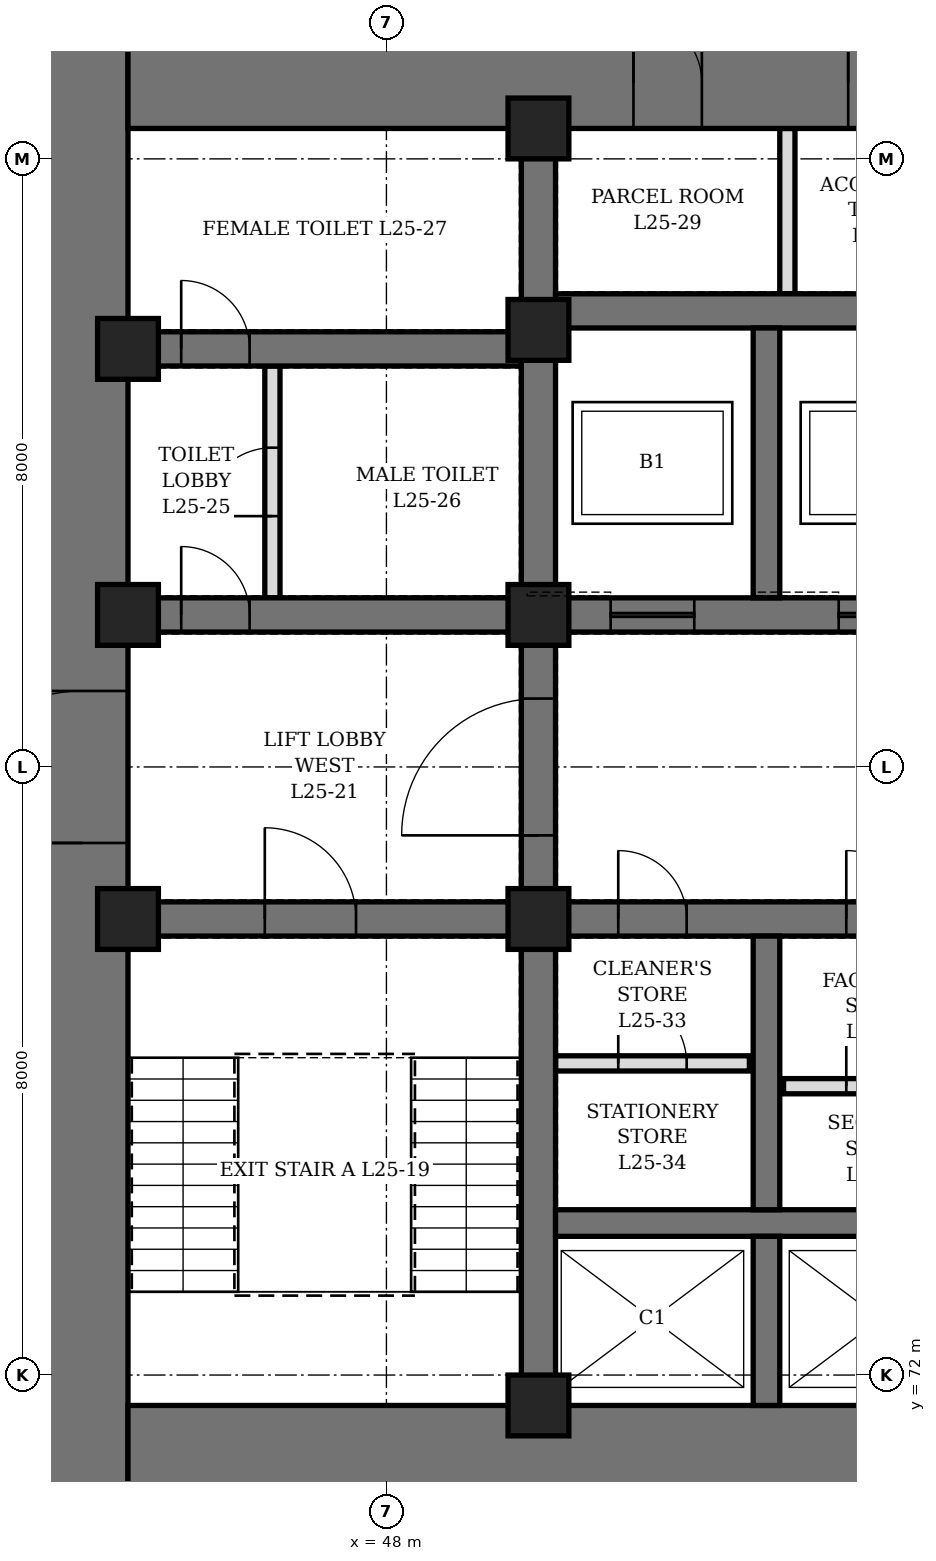
"""IFC4 building model, lengths in metres.
Left out: names, types, materials, properties, quantities, classifications, styles, units other than length and angle.
Written with IfcOpenShell. Run it as: python <this file> out.ifc"""

import sys

from ifc_helpers import new_model, si_unit, direction, frame, frame_2d, origin, origin_2d, place, context, subcontext, project, spatial, rectangle, hollow_rectangle, extrude, element, fill, save


model = new_model("IFC4")
c1 = context("Model", 3, precision=1e-05, world=origin(), true_north=direction((0.0, 1.0)))
c2 = subcontext(c1, "Body", "Model", "MODEL_VIEW")
j1 = project(units=[si_unit("LENGTHUNIT", "METRE"), si_unit("PLANEANGLEUNIT", "RADIAN")], contexts=[c1])
p1 = place(None, origin())
s1 = spatial("IfcSite", under=j1, at=p1, CompositionType="ELEMENT")
p2 = place(p1, origin())
s2 = spatial("IfcBuilding", under=s1, at=p2, CompositionType="ELEMENT")
p3 = place(p2, frame((0.0, 0.0, 116.5)))
s3 = spatial("IfcBuildingStorey", under=s2, at=p3, CompositionType="ELEMENT", Elevation=116.5)
p4 = place(p3, frame((44.0, 70.4, 0.0), z_axis=(0.0, 0.0, 1.0), x_axis=(0.0, 1.0, 0.0)))
e1 = element("IfcWall", 1, at=p4, inside=s3, PredefinedType="SHEAR", context=c2, shape_type="SweptSolid", body=[
    extrude(rectangle(XDim=19.2, YDim=1.2, at=frame_2d((9.6, 0.0))), origin(), (0.0, 0.0, 1.0), 4.2),
])
p5 = place(p4, frame((8.6, 0.0, 0.0)))
e2 = element("IfcOpeningElement", 2, at=p5, cuts=e1, PredefinedType="OPENING", context=c2, shape_type="SweptSolid", body=[
    extrude(rectangle(XDim=2.0, YDim=2.4, at=frame_2d((1.0, 1.2))), frame((0.0, 0.61, 0.0), z_axis=(0.0, -1.0, 0.0), x_axis=(1.0, 0.0, 0.0)), (0.0, 0.0, 1.0), 1.22),
])
p6 = place(p3, frame((44.6, 71.0, 0.0), z_axis=(0.0, 0.0, 1.0), x_axis=(1.0, 0.0, 0.0)))
e3 = element("IfcWall", 3, at=p6, inside=s3, PredefinedType="SHEAR", context=c2, shape_type="SweptSolid", body=[
    extrude(rectangle(XDim=22.8, YDim=1.2, at=frame_2d((11.4, 0.0))), origin(), (0.0, 0.0, 1.0), 4.2),
])
p7 = place(p3, frame((44.6, 89.0, 0.0), z_axis=(0.0, 0.0, 1.0), x_axis=(1.0, 0.0, 0.0)))
e4 = element("IfcWall", 4, at=p7, inside=s3, PredefinedType="SHEAR", context=c2, shape_type="SweptSolid", body=[
    extrude(rectangle(XDim=22.8, YDim=1.2, at=frame_2d((11.4, 0.0))), origin(), (0.0, 0.0, 1.0), 4.2),
])
p8 = place(p7, frame((9.475, 0.0, 0.0)))
e5 = element("IfcOpeningElement", 5, at=p8, cuts=e4, PredefinedType="OPENING", context=c2, shape_type="SweptSolid", body=[
    extrude(rectangle(XDim=1.0, YDim=2.1, at=frame_2d((0.5, 1.05))), frame((0.0, 0.61, 0.0), z_axis=(0.0, -1.0, 0.0), x_axis=(1.0, 0.0, 0.0)), (0.0, 0.0, 1.0), 1.22),
])
p9 = place(p7, frame((6.65, 0.0, 0.0)))
e6 = element("IfcOpeningElement", 6, at=p9, cuts=e4, PredefinedType="OPENING", context=c2, shape_type="SweptSolid", body=[
    extrude(rectangle(XDim=0.9, YDim=2.1, at=frame_2d((0.45, 1.05))), frame((0.0, 0.61, 0.0), z_axis=(0.0, -1.0, 0.0), x_axis=(1.0, 0.0, 0.0)), (0.0, 0.0, 1.0), 1.22),
])
p10 = place(p7, frame((12.025, 0.0, 0.0)))
e7 = element("IfcOpeningElement", 7, at=p10, cuts=e4, PredefinedType="OPENING", context=c2, shape_type="SweptSolid", body=[
    extrude(rectangle(XDim=0.9, YDim=2.1, at=frame_2d((0.45, 1.05))), frame((0.0, 0.61, 0.0), z_axis=(0.0, -1.0, 0.0), x_axis=(1.0, 0.0, 0.0)), (0.0, 0.0, 1.0), 1.22),
])
p11 = place(p7, frame((13.962, 0.0, 0.0)))
e8 = element("IfcOpeningElement", 8, at=p11, cuts=e4, PredefinedType="OPENING", context=c2, shape_type="SweptSolid", body=[
    extrude(rectangle(XDim=0.9, YDim=2.1, at=frame_2d((0.45, 1.05))), frame((0.0, 0.61, 0.0), z_axis=(0.0, -1.0, 0.0), x_axis=(1.0, 0.0, 0.0)), (0.0, 0.0, 1.0), 1.22),
])
p12 = place(p3, frame((50.0, 71.6, 0.0), z_axis=(0.0, 0.0, 1.0), x_axis=(0.0, 1.0, 0.0)))
e9 = element("IfcWall", 9, at=p12, inside=s3, PredefinedType="SHEAR", context=c2, shape_type="SweptSolid", body=[
    extrude(rectangle(XDim=16.8, YDim=0.45, at=frame_2d((8.4, 0.0))), origin(), (0.0, 0.0, 1.0), 4.2),
])
p13 = place(p12, frame((7.5, 0.0, 0.0)))
e10 = element("IfcOpeningElement", 10, at=p13, cuts=e9, PredefinedType="OPENING", context=c2, shape_type="SweptSolid", body=[
    extrude(rectangle(XDim=1.8, YDim=2.4, at=frame_2d((0.9, 1.2))), frame((0.0, 0.235, 0.0), z_axis=(0.0, -1.0, 0.0), x_axis=(1.0, 0.0, 0.0)), (0.0, 0.0, 1.0), 0.47),
])
p14 = place(p3, frame((44.6, 78.0, 0.0), z_axis=(0.0, 0.0, 1.0), x_axis=(1.0, 0.0, 0.0)))
e11 = element("IfcWall", 11, at=p14, inside=s3, PredefinedType="SHEAR", context=c2, shape_type="SweptSolid", body=[
    extrude(rectangle(XDim=5.175, YDim=0.45, at=frame_2d((2.587, 0.0))), origin(), (0.0, 0.0, 1.0), 4.2),
])
p15 = place(p14, frame((1.8, 0.0, 0.0)))
e12 = element("IfcOpeningElement", 12, at=p15, cuts=e11, PredefinedType="OPENING", context=c2, shape_type="SweptSolid", body=[
    extrude(rectangle(XDim=1.2, YDim=2.1, at=frame_2d((0.6, 1.05))), frame((0.0, 0.235, 0.0), z_axis=(0.0, -1.0, 0.0), x_axis=(1.0, 0.0, 0.0)), (0.0, 0.0, 1.0), 0.47),
])
p16 = place(p3, frame((44.6, 82.0, 0.0), z_axis=(0.0, 0.0, 1.0), x_axis=(1.0, 0.0, 0.0)))
e13 = element("IfcWall", 13, at=p16, inside=s3, PredefinedType="SHEAR", context=c2, shape_type="SweptSolid", body=[
    extrude(rectangle(XDim=5.175, YDim=0.45, at=frame_2d((2.587, 0.0))), origin(), (0.0, 0.0, 1.0), 4.2),
])
p17 = place(p16, frame((0.7, 0.0, 0.0)))
e14 = element("IfcOpeningElement", 14, at=p17, cuts=e13, PredefinedType="OPENING", context=c2, shape_type="SweptSolid", body=[
    extrude(rectangle(XDim=0.9, YDim=2.1, at=frame_2d((0.45, 1.05))), frame((0.0, 0.235, 0.0), z_axis=(0.0, -1.0, 0.0), x_axis=(1.0, 0.0, 0.0)), (0.0, 0.0, 1.0), 0.47),
])
p18 = place(p3, frame((44.6, 85.5, 0.0), z_axis=(0.0, 0.0, 1.0), x_axis=(1.0, 0.0, 0.0)))
e15 = element("IfcWall", 15, at=p18, inside=s3, PredefinedType="SHEAR", context=c2, shape_type="SweptSolid", body=[
    extrude(rectangle(XDim=5.175, YDim=0.45, at=frame_2d((2.587, 0.0))), origin(), (0.0, 0.0, 1.0), 4.2),
])
p19 = place(p18, frame((0.7, 0.0, 0.0)))
e16 = element("IfcOpeningElement", 16, at=p19, cuts=e15, PredefinedType="OPENING", context=c2, shape_type="SweptSolid", body=[
    extrude(rectangle(XDim=0.9, YDim=2.1, at=frame_2d((0.45, 1.05))), frame((0.0, 0.235, 0.0), z_axis=(0.0, -1.0, 0.0), x_axis=(1.0, 0.0, 0.0)), (0.0, 0.0, 1.0), 0.47),
])
p20 = place(p3, frame((50.225, 78.0, 0.0), z_axis=(0.0, 0.0, 1.0), x_axis=(1.0, 0.0, 0.0)))
e17 = element("IfcWall", 17, at=p20, inside=s3, PredefinedType="SHEAR", context=c2, shape_type="SweptSolid", body=[
    extrude(rectangle(XDim=11.55, YDim=0.45, at=frame_2d((5.775, 0.0))), origin(), (0.0, 0.0, 1.0), 4.2),
])
p21 = place(p20, frame((0.825, 0.0, 0.0)))
e18 = element("IfcOpeningElement", 18, at=p21, cuts=e17, PredefinedType="OPENING", context=c2, shape_type="SweptSolid", body=[
    extrude(rectangle(XDim=0.9, YDim=2.1, at=frame_2d((0.45, 1.05))), frame((0.0, 0.235, 0.0), z_axis=(0.0, -1.0, 0.0), x_axis=(1.0, 0.0, 0.0)), (0.0, 0.0, 1.0), 0.47),
])
p22 = place(p20, frame((3.825, 0.0, 0.0)))
e19 = element("IfcOpeningElement", 19, at=p22, cuts=e17, PredefinedType="OPENING", context=c2, shape_type="SweptSolid", body=[
    extrude(rectangle(XDim=0.9, YDim=2.1, at=frame_2d((0.45, 1.05))), frame((0.0, 0.235, 0.0), z_axis=(0.0, -1.0, 0.0), x_axis=(1.0, 0.0, 0.0)), (0.0, 0.0, 1.0), 0.47),
])
p23 = place(p20, frame((6.825, 0.0, 0.0)))
e20 = element("IfcOpeningElement", 20, at=p23, cuts=e17, PredefinedType="OPENING", context=c2, shape_type="SweptSolid", body=[
    extrude(rectangle(XDim=0.9, YDim=2.1, at=frame_2d((0.45, 1.05))), frame((0.0, 0.235, 0.0), z_axis=(0.0, -1.0, 0.0), x_axis=(1.0, 0.0, 0.0)), (0.0, 0.0, 1.0), 0.47),
])
p24 = place(p20, frame((9.825, 0.0, 0.0)))
e21 = element("IfcOpeningElement", 21, at=p24, cuts=e17, PredefinedType="OPENING", context=c2, shape_type="SweptSolid", body=[
    extrude(rectangle(XDim=0.9, YDim=2.1, at=frame_2d((0.45, 1.05))), frame((0.0, 0.235, 0.0), z_axis=(0.0, -1.0, 0.0), x_axis=(1.0, 0.0, 0.0)), (0.0, 0.0, 1.0), 0.47),
])
p25 = place(p3, frame((50.225, 82.0, 0.0), z_axis=(0.0, 0.0, 1.0), x_axis=(1.0, 0.0, 0.0)))
e22 = element("IfcWall", 22, at=p25, inside=s3, PredefinedType="SHEAR", context=c2, shape_type="SweptSolid", body=[
    extrude(rectangle(XDim=11.55, YDim=0.45, at=frame_2d((5.775, 0.0))), origin(), (0.0, 0.0, 1.0), 4.2),
])
p26 = place(p25, frame((0.725, 0.0, 0.0)))
e23 = element("IfcOpeningElement", 23, at=p26, cuts=e22, PredefinedType="OPENING", context=c2, shape_type="SweptSolid", body=[
    extrude(rectangle(XDim=1.1, YDim=2.2, at=frame_2d((0.55, 1.1))), frame((0.0, 0.235, 0.0), z_axis=(0.0, -1.0, 0.0), x_axis=(1.0, 0.0, 0.0)), (0.0, 0.0, 1.0), 0.47),
])
p27 = place(p25, frame((3.725, 0.0, 0.0)))
e24 = element("IfcOpeningElement", 24, at=p27, cuts=e22, PredefinedType="OPENING", context=c2, shape_type="SweptSolid", body=[
    extrude(rectangle(XDim=1.1, YDim=2.2, at=frame_2d((0.55, 1.1))), frame((0.0, 0.235, 0.0), z_axis=(0.0, -1.0, 0.0), x_axis=(1.0, 0.0, 0.0)), (0.0, 0.0, 1.0), 0.47),
])
p28 = place(p25, frame((6.725, 0.0, 0.0)))
e25 = element("IfcOpeningElement", 25, at=p28, cuts=e22, PredefinedType="OPENING", context=c2, shape_type="SweptSolid", body=[
    extrude(rectangle(XDim=1.1, YDim=2.2, at=frame_2d((0.55, 1.1))), frame((0.0, 0.235, 0.0), z_axis=(0.0, -1.0, 0.0), x_axis=(1.0, 0.0, 0.0)), (0.0, 0.0, 1.0), 0.47),
])
p29 = place(p25, frame((9.725, 0.0, 0.0)))
e26 = element("IfcOpeningElement", 26, at=p29, cuts=e22, PredefinedType="OPENING", context=c2, shape_type="SweptSolid", body=[
    extrude(rectangle(XDim=1.1, YDim=2.2, at=frame_2d((0.55, 1.1))), frame((0.0, 0.235, 0.0), z_axis=(0.0, -1.0, 0.0), x_axis=(1.0, 0.0, 0.0)), (0.0, 0.0, 1.0), 0.47),
])
p30 = place(p3, frame((50.225, 86.0, 0.0), z_axis=(0.0, 0.0, 1.0), x_axis=(1.0, 0.0, 0.0)))
e27 = element("IfcWall", 27, at=p30, inside=s3, PredefinedType="SHEAR", context=c2, shape_type="SweptSolid", body=[
    extrude(rectangle(XDim=11.55, YDim=0.45, at=frame_2d((5.775, 0.0))), origin(), (0.0, 0.0, 1.0), 4.2),
])
p31 = place(p3, frame((50.225, 74.0, 0.0), z_axis=(0.0, 0.0, 1.0), x_axis=(1.0, 0.0, 0.0)))
e28 = element("IfcWall", 28, at=p31, inside=s3, PredefinedType="SHEAR", context=c2, shape_type="SweptSolid", body=[
    extrude(rectangle(XDim=11.55, YDim=0.35, at=frame_2d((5.775, 0.0))), origin(), (0.0, 0.0, 1.0), 4.2),
])
p32 = place(p3, frame((53.0, 71.6, 0.0), z_axis=(0.0, 0.0, 1.0), x_axis=(0.0, 1.0, 0.0)))
e29 = element("IfcWall", 29, at=p32, inside=s3, PredefinedType="SHEAR", context=c2, shape_type="SweptSolid", body=[
    extrude(rectangle(XDim=2.225, YDim=0.35, at=frame_2d((1.112, 0.0))), origin(), (0.0, 0.0, 1.0), 4.2),
])
p33 = place(p3, frame((53.0, 74.175, 0.0), z_axis=(0.0, 0.0, 1.0), x_axis=(0.0, 1.0, 0.0)))
e30 = element("IfcWall", 30, at=p33, inside=s3, PredefinedType="SHEAR", context=c2, shape_type="SweptSolid", body=[
    extrude(rectangle(XDim=3.6, YDim=0.35, at=frame_2d((1.8, 0.0))), origin(), (0.0, 0.0, 1.0), 4.2),
])
p34 = place(p3, frame((53.0, 82.225, 0.0), z_axis=(0.0, 0.0, 1.0), x_axis=(0.0, 1.0, 0.0)))
e31 = element("IfcWall", 31, at=p34, inside=s3, PredefinedType="SHEAR", context=c2, shape_type="SweptSolid", body=[
    extrude(rectangle(XDim=3.55, YDim=0.35, at=frame_2d((1.775, 0.0))), origin(), (0.0, 0.0, 1.0), 4.2),
])
for number, where, z_axis, x_axis in (
    (32, (44.6, 78.0, 0.0), (0.0, 0.0, 1.0), (1.0, 0.0, 0.0)),
    (33, (44.6, 82.0, 0.0), (0.0, 0.0, 1.0), (1.0, 0.0, 0.0)),
    (34, (44.6, 85.5, 0.0), (0.0, 0.0, 1.0), (1.0, 0.0, 0.0)),
    (35, (50.0, 71.6, 0.0), (0.0, 0.0, 1.0), (1.0, 0.0, 0.0)),
    (36, (50.0, 78.0, 0.0), (0.0, 0.0, 1.0), (1.0, 0.0, 0.0)),
    (37, (50.0, 82.0, 0.0), (0.0, 0.0, 1.0), (1.0, 0.0, 0.0)),
    (38, (50.0, 85.75, 0.0), (0.0, 0.0, 1.0), (1.0, 0.0, 0.0)),
    (39, (50.0, 88.4, 0.0), (0.0, 0.0, 1.0), (1.0, 0.0, 0.0)),
):
    element("IfcColumn", number, at=place(p3, frame(where, z_axis=z_axis, x_axis=x_axis)), inside=s3, PredefinedType="COLUMN", context=c2, shape_type="SweptSolid", body=[
        extrude(hollow_rectangle(XDim=0.8, YDim=0.8, WallThickness=0.1, at=origin_2d()), origin(), (0.0, 0.0, 1.0), 4.2),
    ])
p35 = place(p3, frame((46.5, 82.225, 0.0), z_axis=(0.0, 0.0, 1.0), x_axis=(0.0, 1.0, 0.0)))
e40 = element("IfcWall", 40, at=p35, inside=s3, PredefinedType="PARTITIONING", context=c2, shape_type="SweptSolid", body=[
    extrude(rectangle(XDim=3.05, YDim=0.2, at=frame_2d((1.525, 0.0))), origin(), (0.0, 0.0, 1.0), 4.04),
])
p36 = place(p35, frame((1.075, 0.0, 0.0)))
e41 = element("IfcOpeningElement", 41, at=p36, cuts=e40, PredefinedType="OPENING", context=c2, shape_type="SweptSolid", body=[
    extrude(rectangle(XDim=0.9, YDim=2.1, at=frame_2d((0.45, 1.05))), frame((0.0, 0.11, 0.0), z_axis=(0.0, -1.0, 0.0), x_axis=(1.0, 0.0, 0.0)), (0.0, 0.0, 1.0), 0.22),
])
p37 = place(p3, frame((53.275, 86.225, 0.0), z_axis=(0.0, 0.0, 1.0), x_axis=(0.0, 1.0, 0.0)))
e42 = element("IfcWall", 42, at=p37, inside=s3, PredefinedType="PARTITIONING", context=c2, shape_type="SweptSolid", body=[
    extrude(rectangle(XDim=2.175, YDim=0.2, at=frame_2d((1.087, 0.0))), origin(), (0.0, 0.0, 1.0), 4.04),
])
p38 = place(p3, frame((50.225, 76.1, 0.0), z_axis=(0.0, 0.0, 1.0), x_axis=(1.0, 0.0, 0.0)))
e43 = element("IfcWall", 43, at=p38, inside=s3, PredefinedType="PARTITIONING", context=c2, shape_type="SweptSolid", body=[
    extrude(rectangle(XDim=2.55, YDim=0.2, at=frame_2d((1.275, 0.0))), origin(), (0.0, 0.0, 1.0), 4.04),
])
p39 = place(p38, frame((0.825, 0.0, 0.0)))
e44 = element("IfcOpeningElement", 44, at=p39, cuts=e43, PredefinedType="OPENING", context=c2, shape_type="SweptSolid", body=[
    extrude(rectangle(XDim=0.9, YDim=2.1, at=frame_2d((0.45, 1.05))), frame((0.0, 0.11, 0.0), z_axis=(0.0, -1.0, 0.0), x_axis=(1.0, 0.0, 0.0)), (0.0, 0.0, 1.0), 0.22),
])
p40 = place(p3, frame((53.225, 75.8, 0.0), z_axis=(0.0, 0.0, 1.0), x_axis=(1.0, 0.0, 0.0)))
e45 = element("IfcWall", 45, at=p40, inside=s3, PredefinedType="PARTITIONING", context=c2, shape_type="SweptSolid", body=[
    extrude(rectangle(XDim=2.55, YDim=0.2, at=frame_2d((1.275, 0.0))), origin(), (0.0, 0.0, 1.0), 4.04),
])
p41 = place(p40, frame((0.825, 0.0, 0.0)))
e46 = element("IfcOpeningElement", 46, at=p41, cuts=e45, PredefinedType="OPENING", context=c2, shape_type="SweptSolid", body=[
    extrude(rectangle(XDim=0.9, YDim=2.1, at=frame_2d((0.45, 1.05))), frame((0.0, 0.11, 0.0), z_axis=(0.0, -1.0, 0.0), x_axis=(1.0, 0.0, 0.0)), (0.0, 0.0, 1.0), 0.22),
])
p42 = place(p17, origin())
e47 = element("IfcDoor", 47, at=p42, inside=s3, OperationType="SINGLE_SWING_LEFT", PredefinedType="DOOR", context=c2, shape_type="SweptSolid", body=[
    extrude(rectangle(XDim=0.9, YDim=2.1, at=frame_2d((0.45, 1.05))), frame((0.0, 0.225, 0.0), z_axis=(0.0, -1.0, 0.0), x_axis=(1.0, 0.0, 0.0)), (0.0, 0.0, 1.0), 0.449),
])
fill(e14, e47)
p43 = place(p36, origin())
e48 = element("IfcDoor", 48, at=p43, inside=s3, OperationType="SINGLE_SWING_RIGHT", PredefinedType="DOOR", context=c2, shape_type="SweptSolid", body=[
    extrude(rectangle(XDim=0.9, YDim=2.1, at=frame_2d((0.45, 1.05))), frame((0.0, 0.1, 0.0), z_axis=(0.0, -1.0, 0.0), x_axis=(1.0, 0.0, 0.0)), (0.0, 0.0, 1.0), 0.199),
])
fill(e41, e48)
p44 = place(p19, origin())
e49 = element("IfcDoor", 49, at=p44, inside=s3, OperationType="SINGLE_SWING_RIGHT", PredefinedType="DOOR", context=c2, shape_type="SweptSolid", body=[
    extrude(rectangle(XDim=0.9, YDim=2.1, at=frame_2d((0.45, 1.05))), frame((0.0, 0.225, 0.0), z_axis=(0.0, -1.0, 0.0), x_axis=(1.0, 0.0, 0.0)), (0.0, 0.0, 1.0), 0.449),
])
fill(e16, e49)
p45 = place(p8, origin())
e50 = element("IfcDoor", 50, at=p45, inside=s3, OperationType="SINGLE_SWING_LEFT", PredefinedType="DOOR", context=c2, shape_type="SweptSolid", body=[
    extrude(rectangle(XDim=1.0, YDim=2.1, at=frame_2d((0.5, 1.05))), frame((0.0, 0.35, 0.0), z_axis=(0.0, -1.0, 0.0), x_axis=(1.0, 0.0, 0.0)), (0.0, 0.0, 1.0), 0.7),
])
fill(e5, e50)
p46 = place(p9, origin())
e51 = element("IfcDoor", 51, at=p46, inside=s3, OperationType="SINGLE_SWING_LEFT", PredefinedType="DOOR", context=c2, shape_type="SweptSolid", body=[
    extrude(rectangle(XDim=0.9, YDim=2.1, at=frame_2d((0.45, 1.05))), frame((0.0, 0.35, 0.0), z_axis=(0.0, -1.0, 0.0), x_axis=(1.0, 0.0, 0.0)), (0.0, 0.0, 1.0), 0.7),
])
fill(e6, e51)
p47 = place(p21, origin())
e52 = element("IfcDoor", 52, at=p47, inside=s3, OperationType="SINGLE_SWING_LEFT", PredefinedType="DOOR", context=c2, shape_type="SweptSolid", body=[
    extrude(rectangle(XDim=0.9, YDim=2.1, at=frame_2d((0.45, 1.05))), frame((0.0, 0.225, 0.0), z_axis=(0.0, -1.0, 0.0), x_axis=(1.0, 0.0, 0.0)), (0.0, 0.0, 1.0), 0.449),
])
fill(e18, e52)
p48 = place(p39, origin())
e53 = element("IfcDoor", 53, at=p48, inside=s3, OperationType="SINGLE_SWING_LEFT", PredefinedType="DOOR", context=c2, shape_type="SweptSolid", body=[
    extrude(rectangle(XDim=0.9, YDim=2.1, at=frame_2d((0.45, 1.05))), frame((0.0, 0.1, 0.0), z_axis=(0.0, -1.0, 0.0), x_axis=(1.0, 0.0, 0.0)), (0.0, 0.0, 1.0), 0.199),
])
fill(e44, e53)
p49 = place(p22, origin())
e54 = element("IfcDoor", 54, at=p49, inside=s3, OperationType="SINGLE_SWING_LEFT", PredefinedType="DOOR", context=c2, shape_type="SweptSolid", body=[
    extrude(rectangle(XDim=0.9, YDim=2.1, at=frame_2d((0.45, 1.05))), frame((0.0, 0.225, 0.0), z_axis=(0.0, -1.0, 0.0), x_axis=(1.0, 0.0, 0.0)), (0.0, 0.0, 1.0), 0.449),
])
fill(e19, e54)
p50 = place(p41, origin())
e55 = element("IfcDoor", 55, at=p50, inside=s3, OperationType="SINGLE_SWING_LEFT", PredefinedType="DOOR", context=c2, shape_type="SweptSolid", body=[
    extrude(rectangle(XDim=0.9, YDim=2.1, at=frame_2d((0.45, 1.05))), frame((0.0, 0.1, 0.0), z_axis=(0.0, -1.0, 0.0), x_axis=(1.0, 0.0, 0.0)), (0.0, 0.0, 1.0), 0.199),
])
fill(e46, e55)
p51 = place(p15, origin())
e56 = element("IfcDoor", 56, at=p51, inside=s3, OperationType="SINGLE_SWING_LEFT", PredefinedType="DOOR", context=c2, shape_type="SweptSolid", body=[
    extrude(rectangle(XDim=1.2, YDim=2.1, at=frame_2d((0.6, 1.05))), frame((0.0, 0.225, 0.0), z_axis=(0.0, -1.0, 0.0), x_axis=(1.0, 0.0, 0.0)), (0.0, 0.0, 1.0), 0.449),
])
fill(e12, e56)
p52 = place(p5, origin())
e57 = element("IfcDoor", 57, at=p52, inside=s3, OperationType="DOUBLE_DOOR_SINGLE_SWING", PredefinedType="DOOR", context=c2, shape_type="SweptSolid", body=[
    extrude(rectangle(XDim=2.0, YDim=2.4, at=frame_2d((1.0, 1.2))), frame((0.0, 0.35, 0.0), z_axis=(0.0, -1.0, 0.0), x_axis=(1.0, 0.0, 0.0)), (0.0, 0.0, 1.0), 0.7),
])
fill(e2, e57)
p53 = place(p13, origin())
e58 = element("IfcDoor", 58, at=p53, inside=s3, OperationType="DOUBLE_DOOR_SINGLE_SWING", PredefinedType="DOOR", context=c2, shape_type="SweptSolid", body=[
    extrude(rectangle(XDim=1.8, YDim=2.4, at=frame_2d((0.9, 1.2))), frame((0.0, 0.225, 0.0), z_axis=(0.0, -1.0, 0.0), x_axis=(1.0, 0.0, 0.0)), (0.0, 0.0, 1.0), 0.449),
])
fill(e10, e58)
p54 = place(p26, origin())
e59 = element("IfcDoor", 59, at=p54, inside=s3, OperationType="SLIDING_TO_LEFT", PredefinedType="DOOR", context=c2, shape_type="SweptSolid", body=[
    extrude(rectangle(XDim=1.1, YDim=2.2, at=frame_2d((0.55, 1.1))), frame((0.0, 0.225, 0.0), z_axis=(0.0, -1.0, 0.0), x_axis=(1.0, 0.0, 0.0)), (0.0, 0.0, 1.0), 0.449),
])
fill(e23, e59)
p55 = place(p27, origin())
e60 = element("IfcDoor", 60, at=p55, inside=s3, OperationType="SLIDING_TO_LEFT", PredefinedType="DOOR", context=c2, shape_type="SweptSolid", body=[
    extrude(rectangle(XDim=1.1, YDim=2.2, at=frame_2d((0.55, 1.1))), frame((0.0, 0.225, 0.0), z_axis=(0.0, -1.0, 0.0), x_axis=(1.0, 0.0, 0.0)), (0.0, 0.0, 1.0), 0.449),
])
fill(e24, e60)
save(model, sys.argv[1])
